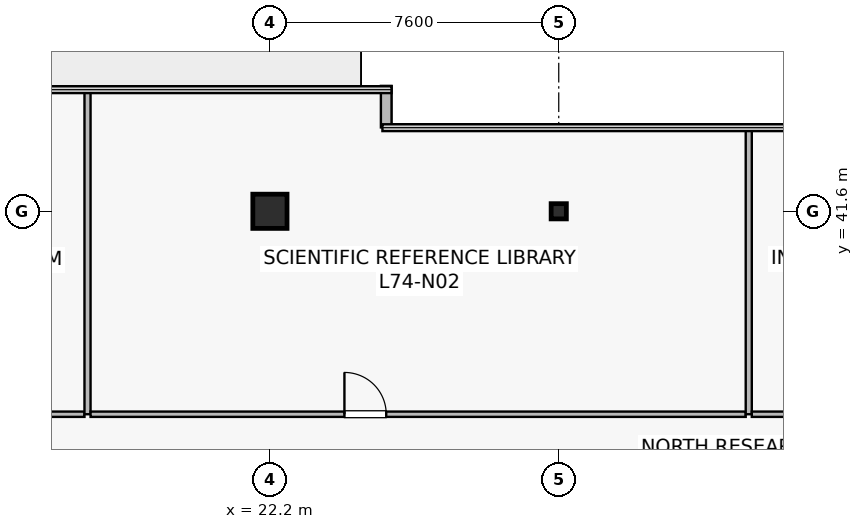
"""IFC4 building model, lengths in metres.
Left out: names, types, materials, properties, quantities, classifications, styles, units other than length and angle.
Written with IfcOpenShell. Run it as: python <this file> out.ifc"""

import sys

from ifc_helpers import new_model, si_unit, direction, frame, frame_2d, origin, origin_2d, place, context, subcontext, project, spatial, rectangle, i_section, extrude, source, transform, mapped, element, fill, save


model = new_model("IFC4")
c1 = context("Model", 3, precision=1e-05, world=origin(), true_north=direction((0.0, 1.0)))
c2 = subcontext(c1, "Body", "Model", "MODEL_VIEW")
j1 = project(units=[si_unit("LENGTHUNIT", "METRE"), si_unit("PLANEANGLEUNIT", "RADIAN")], contexts=[c1])
p1 = place(None, origin())
s1 = spatial("IfcSite", under=j1, at=p1, CompositionType="ELEMENT")
p2 = place(p1, origin())
s2 = spatial("IfcBuilding", under=s1, at=p2, CompositionType="ELEMENT")
p3 = place(p2, frame((0.0, 0.0, 310.2)))
s3 = spatial("IfcBuildingStorey", under=s2, at=p3, CompositionType="ELEMENT", Elevation=310.2)
m1 = source(origin(), c2, "Body", "SweptSolid", [
    extrude(rectangle(XDim=0.9, YDim=0.9, at=origin_2d()), origin(), (0.0, 0.0, 1.0), 4.2),
])
p4 = place(p3, frame((22.2, 41.6, 0.0), z_axis=(0.0, 0.0, 1.0), x_axis=(1.0, 0.0, 0.0)))
e1 = element("IfcColumn", 1, at=p4, inside=s3, PredefinedType="COLUMN", context=c2, shape_type="MappedRepresentation", body=[
    mapped(m1, transform((0.0, 0.0, 0.0), scale=1.0)),
])
m2 = source(origin(), c2, "Body", "SweptSolid", [
    extrude(i_section(OverallWidth=0.4, OverallDepth=0.4, WebThickness=0.021, FlangeThickness=0.021, at=origin_2d()), origin(), (0.0, 0.0, 1.0), 4.2),
])
p5 = place(p3, frame((29.8, 41.6, 0.0), z_axis=(0.0, 0.0, 1.0), x_axis=(1.0, 0.0, 0.0)))
e2 = element("IfcColumn", 2, at=p5, inside=s3, PredefinedType="COLUMN", context=c2, shape_type="MappedRepresentation", body=[
    mapped(m2, transform((0.0, 0.0, 0.0), scale=1.0)),
])
p6 = place(p3, frame((25.26, 43.807, 0.0), z_axis=(0.0, 0.0, 1.0), x_axis=(0.0, 1.0, 0.0)))
e3 = element("IfcWall", 3, at=p6, inside=s3, PredefinedType="STANDARD", context=c2, shape_type="SweptSolid", body=[
    extrude(rectangle(XDim=1.093, YDim=0.28, at=frame_2d((0.546, 0.0))), origin(), (0.0, 0.0, 1.0), 3.9),
])
p7 = place(p3, frame((5.91, 36.26, 0.0), z_axis=(0.0, 0.0, 1.0), x_axis=(1.0, 0.0, 0.0)))
e4 = element("IfcWall", 4, at=p7, inside=s3, PredefinedType="PARTITIONING", context=c2, shape_type="SweptSolid", body=[
    extrude(rectangle(XDim=11.41, YDim=0.14, at=frame_2d((5.705, 0.0))), origin(), (0.0, 0.0, 1.0), 3.297),
])
p8 = place(p7, frame((5.443, 0.0, 0.0)))
e5 = element("IfcOpeningElement", 5, at=p8, cuts=e4, PredefinedType="OPENING", context=c2, shape_type="SweptSolid", body=[
    extrude(rectangle(XDim=1.1, YDim=2.18, at=frame_2d((0.55, 1.09))), frame((0.0, 0.08, 0.0), z_axis=(0.0, -1.0, 0.0), x_axis=(1.0, 0.0, 0.0)), (0.0, 0.0, 1.0), 0.16),
])
p9 = place(p3, frame((17.4, 36.26, 0.0), z_axis=(0.0, 0.0, 1.0), x_axis=(0.0, 1.0, 0.0)))
e6 = element("IfcWall", 6, at=p9, inside=s3, PredefinedType="PARTITIONING", context=c2, shape_type="SweptSolid", body=[
    extrude(rectangle(XDim=8.53, YDim=0.16, at=frame_2d((4.265, 0.0))), origin(), (0.0, 0.0, 1.0), 3.235),
])
p10 = place(p3, frame((17.48, 36.26, 0.0), z_axis=(0.0, 0.0, 1.0), x_axis=(1.0, 0.0, 0.0)))
e7 = element("IfcWall", 7, at=p10, inside=s3, PredefinedType="PARTITIONING", context=c2, shape_type="SweptSolid", body=[
    extrude(rectangle(XDim=17.24, YDim=0.14, at=frame_2d((8.62, 0.0))), origin(), (0.0, 0.0, 1.0), 3.297),
])
p11 = place(p10, frame((6.68, 0.0, 0.0)))
e8 = element("IfcOpeningElement", 8, at=p11, cuts=e7, PredefinedType="OPENING", context=c2, shape_type="SweptSolid", body=[
    extrude(rectangle(XDim=1.1, YDim=2.18, at=frame_2d((0.55, 1.09))), frame((0.0, 0.08, 0.0), z_axis=(0.0, -1.0, 0.0), x_axis=(1.0, 0.0, 0.0)), (0.0, 0.0, 1.0), 0.16),
])
p12 = place(p3, frame((34.8, 36.26, 0.0), z_axis=(0.0, 0.0, 1.0), x_axis=(0.0, 1.0, 0.0)))
e9 = element("IfcWall", 9, at=p12, inside=s3, PredefinedType="PARTITIONING", context=c2, shape_type="SweptSolid", body=[
    extrude(rectangle(XDim=7.53, YDim=0.16, at=frame_2d((3.765, 0.0))), origin(), (0.0, 0.0, 1.0), 2.985),
])
p13 = place(p3, frame((34.88, 36.26, 0.0), z_axis=(0.0, 0.0, 1.0), x_axis=(1.0, 0.0, 0.0)))
e10 = element("IfcWall", 10, at=p13, inside=s3, PredefinedType="PARTITIONING", context=c2, shape_type="SweptSolid", body=[
    extrude(rectangle(XDim=17.24, YDim=0.14, at=frame_2d((8.62, 0.0))), origin(), (0.0, 0.0, 1.0), 3.297),
])
p14 = place(p13, frame((8.533, 0.0, 0.0)))
e11 = element("IfcOpeningElement", 11, at=p14, cuts=e10, PredefinedType="OPENING", context=c2, shape_type="SweptSolid", body=[
    extrude(rectangle(XDim=1.1, YDim=2.18, at=frame_2d((0.55, 1.09))), frame((0.0, 0.08, 0.0), z_axis=(0.0, -1.0, 0.0), x_axis=(1.0, 0.0, 0.0)), (0.0, 0.0, 1.0), 0.16),
])
m3 = source(origin(), c2, "Body", "SweptSolid", [
    extrude(rectangle(XDim=1.1, YDim=2.18, at=frame_2d((0.55, 1.09))), frame((0.0, 0.025, 0.0), z_axis=(0.0, -1.0, 0.0), x_axis=(1.0, 0.0, 0.0)), (0.0, 0.0, 1.0), 0.05),
])
p15 = place(p11, origin())
e12 = element("IfcDoor", 12, at=p15, inside=s3, OperationType="SINGLE_SWING_LEFT", PredefinedType="DOOR", context=c2, shape_type="MappedRepresentation", body=[
    mapped(m3, transform((0.0, 0.0, 0.0), scale=1.0)),
])
fill(e8, e12)
save(model, sys.argv[1])
